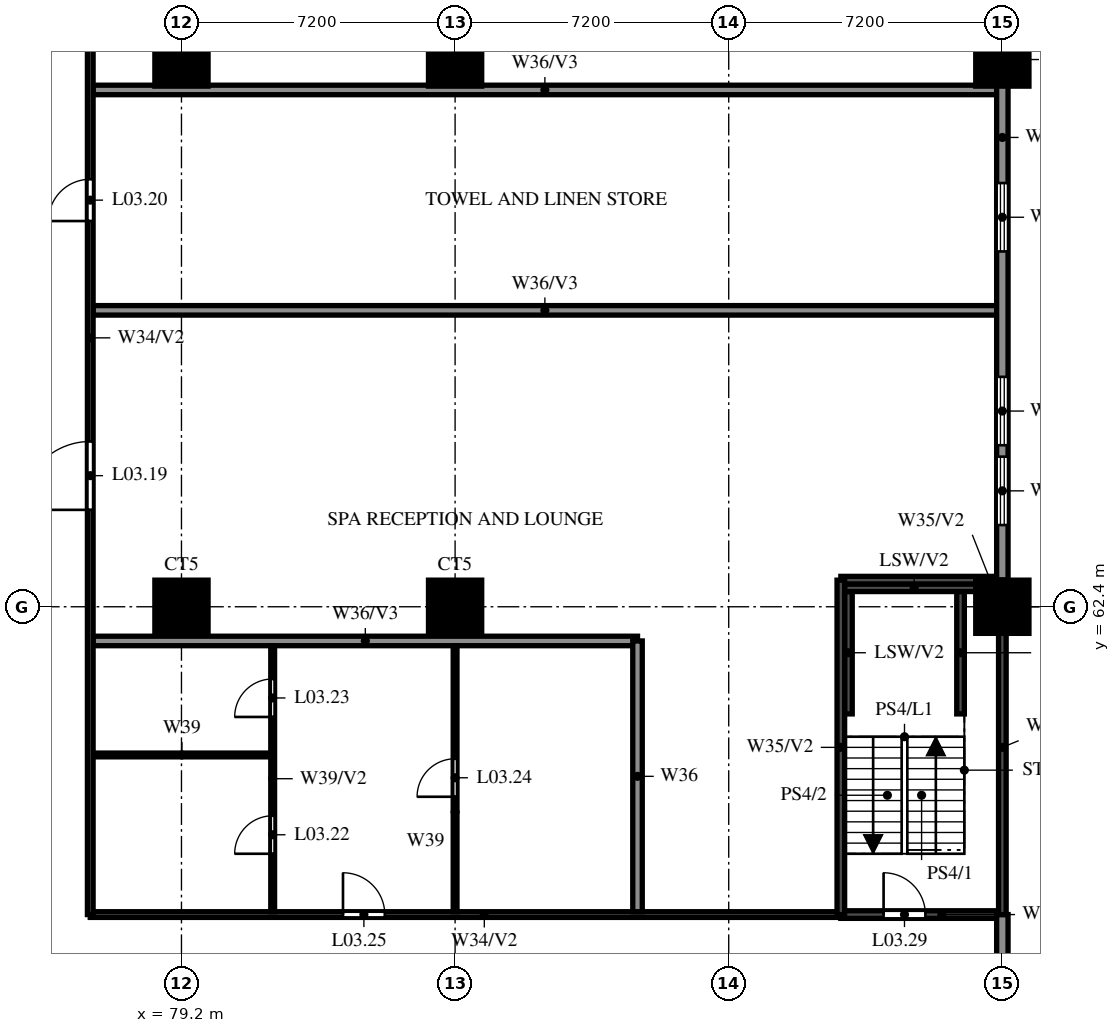
"""IFC4 building model, lengths in metres.
Left out: names, types, materials, properties, quantities, classifications, styles, units other than length and angle.
Written with IfcOpenShell. Run it as: python <this file> out.ifc"""

import sys

from ifc_helpers import new_model, si_unit, direction, frame, frame_2d, origin, origin_2d, place, context, subcontext, project, spatial, rectangle, circle, extrude, source, transform, mapped, element, fill, save


model = new_model("IFC4")
c1 = context("Model", 3, precision=1e-05, world=origin(), true_north=direction((0.0, 1.0)))
c2 = subcontext(c1, "Body", "Model", "MODEL_VIEW")
j1 = project(units=[si_unit("LENGTHUNIT", "METRE"), si_unit("PLANEANGLEUNIT", "RADIAN")], contexts=[c1])
p1 = place(None, origin())
s1 = spatial("IfcSite", under=j1, at=p1, CompositionType="ELEMENT")
p2 = place(p1, origin())
s2 = spatial("IfcBuilding", under=s1, at=p2, CompositionType="ELEMENT")
p3 = place(p2, frame((0.0, 0.0, 17.4)))
s3 = spatial("IfcBuildingStorey", under=s2, at=p3, CompositionType="ELEMENT", Elevation=17.4)
m1 = source(origin(), c2, "Body", "SweptSolid", [
    extrude(circle(Radius=0.7, at=origin_2d()), origin(), (0.0, 0.0, 1.0), 3.8),
])
for number, where, z_axis, x_axis in (
    (1, (79.2, 62.4, 0.0), (0.0, 0.0, 1.0), (1.0, 0.0, 0.0)),
    (2, (86.4, 62.4, 0.0), (0.0, 0.0, 1.0), (1.0, 0.0, 0.0)),
    (3, (100.8, 62.4, 0.0), (0.0, 0.0, 1.0), (1.0, 0.0, 0.0)),
    (4, (79.2, 76.8, 0.0), (0.0, 0.0, 1.0), (1.0, 0.0, 0.0)),
    (5, (86.4, 76.8, 0.0), (0.0, 0.0, 1.0), (1.0, 0.0, 0.0)),
    (6, (100.8, 76.8, 0.0), (0.0, 0.0, 1.0), (1.0, 0.0, 0.0)),
):
    element("IfcColumn", number, at=place(p3, frame(where, z_axis=z_axis, x_axis=x_axis)), inside=s3, PredefinedType="COLUMN", context=c2, shape_type="MappedRepresentation", body=[
        mapped(m1, transform((0.0, 0.0, 0.0))),
    ])
for number, where, z_axis, x_axis in (
    (7, (96.75, 59.58, 0.0), (0.0, 0.0, 1.0), (0.0, 1.0, 0.0)),
    (8, (99.7, 59.58, 0.0), (0.0, 0.0, 1.0), (0.0, 1.0, 0.0)),
):
    element("IfcWall", number, at=place(p3, frame(where, z_axis=z_axis, x_axis=x_axis)), inside=s3, PredefinedType="SOLIDWALL", context=c2, shape_type="SweptSolid", body=[
        extrude(rectangle(XDim=3.22, YDim=0.2, at=frame_2d((1.61, 0.0))), origin(), (0.0, 0.0, 1.0), 1.9),
    ])
p4 = place(p3, frame((96.65, 62.9, 0.0), z_axis=(0.0, 0.0, 1.0), x_axis=(1.0, 0.0, 0.0)))
e9 = element("IfcWall", 9, at=p4, inside=s3, PredefinedType="SOLIDWALL", context=c2, shape_type="SweptSolid", body=[
    extrude(rectangle(XDim=3.66, YDim=0.2, at=frame_2d((1.83, 0.0))), origin(), (0.0, 0.0, 1.0), 1.9),
])
p5 = place(p3, frame((76.8, 54.3, 0.0), z_axis=(0.0, 0.0, 1.0), x_axis=(1.0, 0.0, 0.0)))
e10 = element("IfcWall", 10, at=p5, inside=s3, PredefinedType="PARTITIONING", context=c2, shape_type="SweptSolid", body=[
    extrude(rectangle(XDim=19.75, YDim=0.15, at=frame_2d((9.875, 0.0))), origin(), (0.0, 0.0, 1.0), 2.6),
])
p6 = place(p5, frame((6.65, 0.0, 0.0)))
e11 = element("IfcOpeningElement", 11, at=p6, cuts=e10, PredefinedType="OPENING", context=c2, shape_type="SweptSolid", body=[
    extrude(rectangle(XDim=1.1, YDim=2.1, at=frame_2d((0.55, 1.05))), frame((0.0, 0.085, 0.0), z_axis=(0.0, -1.0, 0.0), x_axis=(1.0, 0.0, 0.0)), (0.0, 0.0, 1.0), 0.17),
])
p7 = place(p3, frame((96.55, 54.3, 0.0), z_axis=(0.0, 0.0, 1.0), x_axis=(1.0, 0.0, 0.0)))
e12 = element("IfcWall", 12, at=p7, inside=s3, PredefinedType="SOLIDWALL", context=c2, shape_type="SweptSolid", body=[
    extrude(rectangle(XDim=4.25, YDim=0.2, at=frame_2d((2.125, 0.0))), origin(), (0.0, 0.0, 1.0), 3.8),
])
p8 = place(p7, frame((1.125, 0.0, 0.0)))
e13 = element("IfcOpeningElement", 13, at=p8, cuts=e12, PredefinedType="OPENING", context=c2, shape_type="SweptSolid", body=[
    extrude(rectangle(XDim=1.1, YDim=2.1, at=frame_2d((0.55, 1.05))), frame((0.0, 0.11, 0.0), z_axis=(0.0, -1.0, 0.0), x_axis=(1.0, 0.0, 0.0)), (0.0, 0.0, 1.0), 0.22),
])
p9 = place(p3, frame((76.875, 58.5, 0.0), z_axis=(0.0, 0.0, 1.0), x_axis=(1.0, 0.0, 0.0)))
e14 = element("IfcWall", 14, at=p9, inside=s3, PredefinedType="PARTITIONING", context=c2, shape_type="SweptSolid", body=[
    extrude(rectangle(XDim=4.675, YDim=0.1, at=frame_2d((2.337, 0.0))), origin(), (0.0, 0.0, 1.0), 2.6),
])
p10 = place(p3, frame((76.875, 61.5, 0.0), z_axis=(0.0, 0.0, 1.0), x_axis=(1.0, 0.0, 0.0)))
e15 = element("IfcWall", 15, at=p10, inside=s3, PredefinedType="SOLIDWALL", context=c2, shape_type="SweptSolid", body=[
    extrude(rectangle(XDim=14.325, YDim=0.25, at=frame_2d((7.163, 0.0))), origin(), (0.0, 0.0, 1.0), 2.6),
])
p11 = place(p3, frame((96.55, 63.1, 0.0), z_axis=(0.0, 0.0, 1.0), x_axis=(1.0, 0.0, 0.0)))
e16 = element("IfcWall", 16, at=p11, inside=s3, PredefinedType="SOLIDWALL", context=c2, shape_type="SweptSolid", body=[
    extrude(rectangle(XDim=4.25, YDim=0.2, at=frame_2d((2.125, 0.0))), origin(), (0.0, 0.0, 1.0), 3.8),
])
for number, where, z_axis, x_axis in (
    (17, (76.875, 70.2, 0.0), (0.0, 0.0, 1.0), (1.0, 0.0, 0.0)),
    (18, (76.875, 76.0, 0.0), (0.0, 0.0, 1.0), (1.0, 0.0, 0.0)),
):
    element("IfcWall", number, at=place(p3, frame(where, z_axis=z_axis, x_axis=x_axis)), inside=s3, PredefinedType="SOLIDWALL", context=c2, shape_type="SweptSolid", body=[
        extrude(rectangle(XDim=23.775, YDim=0.25, at=frame_2d((11.887, 0.0))), origin(), (0.0, 0.0, 1.0), 2.6),
    ])
p12 = place(p3, frame((76.8, 54.3, 0.0), z_axis=(0.0, 0.0, 1.0), x_axis=(0.0, 1.0, 0.0)))
e19 = element("IfcWall", 19, at=p12, inside=s3, PredefinedType="PARTITIONING", context=c2, shape_type="SweptSolid", body=[
    extrude(rectangle(XDim=31.95, YDim=0.15, at=frame_2d((15.975, 0.0))), origin(), (0.0, 0.0, 1.0), 2.6),
])
p13 = place(p12, frame((10.65, 0.0, 0.0)))
e20 = element("IfcOpeningElement", 20, at=p13, cuts=e19, PredefinedType="OPENING", context=c2, shape_type="SweptSolid", body=[
    extrude(rectangle(XDim=1.8, YDim=2.1, at=frame_2d((0.9, 1.05))), frame((0.0, 0.085, 0.0), z_axis=(0.0, -1.0, 0.0), x_axis=(1.0, 0.0, 0.0)), (0.0, 0.0, 1.0), 0.17),
])
p14 = place(p12, frame((18.25, 0.0, 0.0)))
e21 = element("IfcOpeningElement", 21, at=p14, cuts=e19, PredefinedType="OPENING", context=c2, shape_type="SweptSolid", body=[
    extrude(rectangle(XDim=1.1, YDim=2.1, at=frame_2d((0.55, 1.05))), frame((0.0, 0.085, 0.0), z_axis=(0.0, -1.0, 0.0), x_axis=(1.0, 0.0, 0.0)), (0.0, 0.0, 1.0), 0.17),
])
p15 = place(p12, frame((26.0, 0.0, 0.0)))
e22 = element("IfcOpeningElement", 22, at=p15, cuts=e19, PredefinedType="OPENING", context=c2, shape_type="SweptSolid", body=[
    extrude(rectangle(XDim=1.8, YDim=2.1, at=frame_2d((0.9, 1.05))), frame((0.0, 0.085, 0.0), z_axis=(0.0, -1.0, 0.0), x_axis=(1.0, 0.0, 0.0)), (0.0, 0.0, 1.0), 0.17),
])
p16 = place(p3, frame((81.6, 54.375, 0.0), z_axis=(0.0, 0.0, 1.0), x_axis=(0.0, 1.0, 0.0)))
e23 = element("IfcWall", 23, at=p16, inside=s3, PredefinedType="PARTITIONING", context=c2, shape_type="SweptSolid", body=[
    extrude(rectangle(XDim=7.0, YDim=0.1, at=frame_2d((3.5, 0.0))), origin(), (0.0, 0.0, 1.0), 3.8),
])
p17 = place(p16, frame((1.525, 0.0, 0.0)))
e24 = element("IfcOpeningElement", 24, at=p17, cuts=e23, PredefinedType="OPENING", context=c2, shape_type="SweptSolid", body=[
    extrude(rectangle(XDim=1.0, YDim=2.1, at=frame_2d((0.5, 1.05))), frame((0.0, 0.06, 0.0), z_axis=(0.0, -1.0, 0.0), x_axis=(1.0, 0.0, 0.0)), (0.0, 0.0, 1.0), 0.12),
])
p18 = place(p16, frame((5.125, 0.0, 0.0)))
e25 = element("IfcOpeningElement", 25, at=p18, cuts=e23, PredefinedType="OPENING", context=c2, shape_type="SweptSolid", body=[
    extrude(rectangle(XDim=1.0, YDim=2.1, at=frame_2d((0.5, 1.05))), frame((0.0, 0.06, 0.0), z_axis=(0.0, -1.0, 0.0), x_axis=(1.0, 0.0, 0.0)), (0.0, 0.0, 1.0), 0.12),
])
p19 = place(p3, frame((86.4, 54.375, 0.0), z_axis=(0.0, 0.0, 1.0), x_axis=(0.0, 1.0, 0.0)))
e26 = element("IfcWall", 26, at=p19, inside=s3, PredefinedType="PARTITIONING", context=c2, shape_type="SweptSolid", body=[
    extrude(rectangle(XDim=7.0, YDim=0.1, at=frame_2d((3.5, 0.0))), origin(), (0.0, 0.0, 1.0), 2.6),
])
p20 = place(p19, frame((3.025, 0.0, 0.0)))
e27 = element("IfcOpeningElement", 27, at=p20, cuts=e26, PredefinedType="OPENING", context=c2, shape_type="SweptSolid", body=[
    extrude(rectangle(XDim=1.0, YDim=2.1, at=frame_2d((0.5, 1.05))), frame((0.0, 0.06, 0.0), z_axis=(0.0, -1.0, 0.0), x_axis=(1.0, 0.0, 0.0)), (0.0, 0.0, 1.0), 0.12),
])
p21 = place(p3, frame((91.2, 54.375, 0.0), z_axis=(0.0, 0.0, 1.0), x_axis=(0.0, 1.0, 0.0)))
e28 = element("IfcWall", 28, at=p21, inside=s3, PredefinedType="SOLIDWALL", context=c2, shape_type="SweptSolid", body=[
    extrude(rectangle(XDim=7.125, YDim=0.25, at=frame_2d((3.562, 0.0))), origin(), (0.0, 0.0, 1.0), 3.8),
])
p22 = place(p3, frame((96.55, 54.3, 0.0), z_axis=(0.0, 0.0, 1.0), x_axis=(0.0, 1.0, 0.0)))
e29 = element("IfcWall", 29, at=p22, inside=s3, PredefinedType="SOLIDWALL", context=c2, shape_type="SweptSolid", body=[
    extrude(rectangle(XDim=8.8, YDim=0.2, at=frame_2d((4.4, 0.0))), origin(), (0.0, 0.0, 1.0), 3.8),
])
p23 = place(p3, frame((100.8, 51.1, 0.0), z_axis=(0.0, 0.0, 1.0), x_axis=(0.0, 1.0, 0.0)))
e30 = element("IfcWall", 30, at=p23, inside=s3, PredefinedType="SOLIDWALL", context=c2, shape_type="SweptSolid", body=[
    extrude(rectangle(XDim=3.2, YDim=0.3, at=frame_2d((1.6, 0.0))), origin(), (0.0, 0.0, 1.0), 3.8),
])
p24 = place(p3, frame((100.8, 63.1, 0.0), z_axis=(0.0, 0.0, 1.0), x_axis=(0.0, 1.0, 0.0)))
e31 = element("IfcWall", 31, at=p24, inside=s3, PredefinedType="SOLIDWALL", context=c2, shape_type="SweptSolid", body=[
    extrude(rectangle(XDim=23.3, YDim=0.3, at=frame_2d((11.65, 0.0))), origin(), (0.0, 0.0, 1.0), 3.8),
])
p25 = place(p24, frame((1.45, 0.0, 0.6)))
e32 = element("IfcOpeningElement", 32, at=p25, cuts=e31, PredefinedType="OPENING", context=c2, shape_type="SweptSolid", body=[
    extrude(rectangle(XDim=1.8, YDim=2.4, at=frame_2d((0.9, 1.2))), frame((0.0, 0.16, 0.0), z_axis=(0.0, -1.0, 0.0), x_axis=(1.0, 0.0, 0.0)), (0.0, 0.0, 1.0), 0.32),
])
p26 = place(p24, frame((3.55, 0.0, 0.6)))
e33 = element("IfcOpeningElement", 33, at=p26, cuts=e31, PredefinedType="OPENING", context=c2, shape_type="SweptSolid", body=[
    extrude(rectangle(XDim=1.8, YDim=2.4, at=frame_2d((0.9, 1.2))), frame((0.0, 0.16, 0.0), z_axis=(0.0, -1.0, 0.0), x_axis=(1.0, 0.0, 0.0)), (0.0, 0.0, 1.0), 0.32),
])
p27 = place(p24, frame((8.65, 0.0, 0.6)))
e34 = element("IfcOpeningElement", 34, at=p27, cuts=e31, PredefinedType="OPENING", context=c2, shape_type="SweptSolid", body=[
    extrude(rectangle(XDim=1.8, YDim=2.4, at=frame_2d((0.9, 1.2))), frame((0.0, 0.16, 0.0), z_axis=(0.0, -1.0, 0.0), x_axis=(1.0, 0.0, 0.0)), (0.0, 0.0, 1.0), 0.32),
])
p28 = place(p24, frame((15.85, 0.0, 0.6)))
e35 = element("IfcOpeningElement", 35, at=p28, cuts=e31, PredefinedType="OPENING", context=c2, shape_type="SweptSolid", body=[
    extrude(rectangle(XDim=1.8, YDim=2.4, at=frame_2d((0.9, 1.2))), frame((0.0, 0.16, 0.0), z_axis=(0.0, -1.0, 0.0), x_axis=(1.0, 0.0, 0.0)), (0.0, 0.0, 1.0), 0.32),
])
p29 = place(p24, frame((19.45, 0.0, 0.6)))
e36 = element("IfcOpeningElement", 36, at=p29, cuts=e31, PredefinedType="OPENING", context=c2, shape_type="SweptSolid", body=[
    extrude(rectangle(XDim=1.8, YDim=2.4, at=frame_2d((0.9, 1.2))), frame((0.0, 0.16, 0.0), z_axis=(0.0, -1.0, 0.0), x_axis=(1.0, 0.0, 0.0)), (0.0, 0.0, 1.0), 0.32),
])
p30 = place(p3, frame((100.8, 54.3, 0.0), z_axis=(0.0, 0.0, 1.0), x_axis=(0.0, 1.0, 0.0)))
e37 = element("IfcWall", 37, at=p30, inside=s3, PredefinedType="SOLIDWALL", context=c2, shape_type="SweptSolid", body=[
    extrude(rectangle(XDim=8.8, YDim=0.2, at=frame_2d((4.4, 0.0))), origin(), (0.0, 0.0, 1.0), 3.8),
])
p31 = place(p13, origin())
e38 = element("IfcDoor", 38, at=p31, inside=s3, OperationType="DOUBLE_DOOR_SINGLE_SWING", PredefinedType="DOOR", context=c2, shape_type="SweptSolid", body=[
    extrude(rectangle(XDim=1.8, YDim=2.1, at=frame_2d((0.9, 1.05))), frame((0.0, 0.025, 0.0), z_axis=(0.0, -1.0, 0.0), x_axis=(1.0, 0.0, 0.0)), (0.0, 0.0, 1.0), 0.05),
])
fill(e20, e38)
p32 = place(p14, origin())
e39 = element("IfcDoor", 39, at=p32, inside=s3, OperationType="SINGLE_SWING_RIGHT", PredefinedType="DOOR", context=c2, shape_type="SweptSolid", body=[
    extrude(rectangle(XDim=1.1, YDim=2.1, at=frame_2d((0.55, 1.05))), frame((0.0, 0.025, 0.0), z_axis=(0.0, -1.0, 0.0), x_axis=(1.0, 0.0, 0.0)), (0.0, 0.0, 1.0), 0.05),
])
fill(e21, e39)
p33 = place(p17, origin())
e40 = element("IfcDoor", 40, at=p33, inside=s3, OperationType="SINGLE_SWING_LEFT", PredefinedType="DOOR", context=c2, shape_type="SweptSolid", body=[
    extrude(rectangle(XDim=1.0, YDim=2.1, at=frame_2d((0.5, 1.05))), frame((0.0, 0.025, 0.0), z_axis=(0.0, -1.0, 0.0), x_axis=(1.0, 0.0, 0.0)), (0.0, 0.0, 1.0), 0.05),
])
fill(e24, e40)
p34 = place(p18, origin())
e41 = element("IfcDoor", 41, at=p34, inside=s3, OperationType="SINGLE_SWING_RIGHT", PredefinedType="DOOR", context=c2, shape_type="SweptSolid", body=[
    extrude(rectangle(XDim=1.0, YDim=2.1, at=frame_2d((0.5, 1.05))), frame((0.0, 0.025, 0.0), z_axis=(0.0, -1.0, 0.0), x_axis=(1.0, 0.0, 0.0)), (0.0, 0.0, 1.0), 0.05),
])
fill(e25, e41)
p35 = place(p20, origin())
e42 = element("IfcDoor", 42, at=p35, inside=s3, OperationType="SINGLE_SWING_RIGHT", PredefinedType="DOOR", context=c2, shape_type="SweptSolid", body=[
    extrude(rectangle(XDim=1.0, YDim=2.1, at=frame_2d((0.5, 1.05))), frame((0.0, 0.025, 0.0), z_axis=(0.0, -1.0, 0.0), x_axis=(1.0, 0.0, 0.0)), (0.0, 0.0, 1.0), 0.05),
])
fill(e27, e42)
p36 = place(p6, origin())
e43 = element("IfcDoor", 43, at=p36, inside=s3, OperationType="SINGLE_SWING_LEFT", PredefinedType="DOOR", context=c2, shape_type="SweptSolid", body=[
    extrude(rectangle(XDim=1.1, YDim=2.1, at=frame_2d((0.55, 1.05))), frame((0.0, 0.025, 0.0), z_axis=(0.0, -1.0, 0.0), x_axis=(1.0, 0.0, 0.0)), (0.0, 0.0, 1.0), 0.05),
])
fill(e11, e43)
p37 = place(p8, origin())
e44 = element("IfcDoor", 44, at=p37, inside=s3, OperationType="SINGLE_SWING_LEFT", PredefinedType="DOOR", context=c2, shape_type="SweptSolid", body=[
    extrude(rectangle(XDim=1.1, YDim=2.1, at=frame_2d((0.55, 1.05))), frame((0.0, 0.025, 0.0), z_axis=(0.0, -1.0, 0.0), x_axis=(1.0, 0.0, 0.0)), (0.0, 0.0, 1.0), 0.05),
])
fill(e13, e44)
p38 = place(p25, origin())
e45 = element("IfcWindow", 45, at=p38, inside=s3, PartitioningType="DOUBLE_PANEL_VERTICAL", PredefinedType="WINDOW", context=c2, shape_type="SweptSolid", body=[
    extrude(rectangle(XDim=1.8, YDim=2.4, at=frame_2d((0.9, 1.2))), frame((0.0, 0.03, 0.0), z_axis=(0.0, -1.0, 0.0), x_axis=(1.0, 0.0, 0.0)), (0.0, 0.0, 1.0), 0.06),
])
fill(e32, e45)
p39 = place(p26, origin())
e46 = element("IfcWindow", 46, at=p39, inside=s3, PartitioningType="DOUBLE_PANEL_VERTICAL", PredefinedType="WINDOW", context=c2, shape_type="SweptSolid", body=[
    extrude(rectangle(XDim=1.8, YDim=2.4, at=frame_2d((0.9, 1.2))), frame((0.0, 0.03, 0.0), z_axis=(0.0, -1.0, 0.0), x_axis=(1.0, 0.0, 0.0)), (0.0, 0.0, 1.0), 0.06),
])
fill(e33, e46)
p40 = place(p27, origin())
e47 = element("IfcWindow", 47, at=p40, inside=s3, PartitioningType="DOUBLE_PANEL_VERTICAL", PredefinedType="WINDOW", context=c2, shape_type="SweptSolid", body=[
    extrude(rectangle(XDim=1.8, YDim=2.4, at=frame_2d((0.9, 1.2))), frame((0.0, 0.03, 0.0), z_axis=(0.0, -1.0, 0.0), x_axis=(1.0, 0.0, 0.0)), (0.0, 0.0, 1.0), 0.06),
])
fill(e34, e47)
save(model, sys.argv[1])
